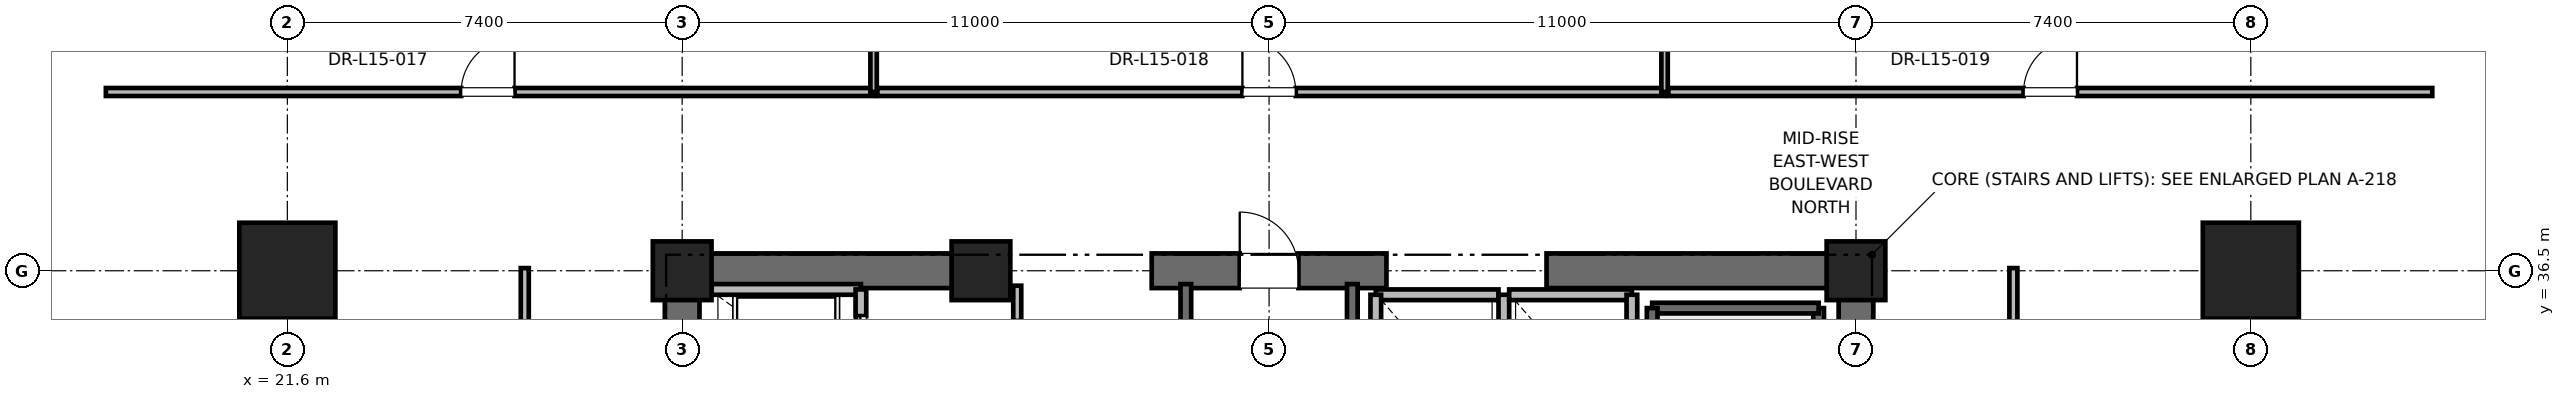
"""IFC4 building model, lengths in metres.
Left out: names, types, materials, properties, quantities, classifications, styles, units other than length and angle.
Written with IfcOpenShell. Run it as: python <this file> out.ifc"""

import sys

from ifc_helpers import new_model, si_unit, direction, frame, frame_2d, origin, origin_2d, place, context, subcontext, project, spatial, rectangle, extrude, element, fill, save


model = new_model("IFC4")
c1 = context("Model", 3, precision=1e-05, world=origin(), true_north=direction((0.0, 1.0)))
c2 = subcontext(c1, "Body", "Model", "MODEL_VIEW")
j1 = project(units=[si_unit("LENGTHUNIT", "METRE"), si_unit("PLANEANGLEUNIT", "RADIAN")], contexts=[c1])
p1 = place(None, origin())
s1 = spatial("IfcSite", under=j1, at=p1, CompositionType="ELEMENT")
p2 = place(p1, origin())
s2 = spatial("IfcBuilding", under=s1, at=p2, CompositionType="ELEMENT")
p3 = place(p2, frame((0.0, 0.0, 67.6)))
s3 = spatial("IfcBuildingStorey", under=s2, at=p3, CompositionType="ELEMENT", Elevation=67.6)
for number, where, z_axis, x_axis in (
    (1, (21.6, 36.5, 0.0), (0.0, 0.0, 1.0), (1.0, 0.0, 0.0)),
    (2, (58.4, 36.5, 0.0), (0.0, 0.0, 1.0), (1.0, 0.0, 0.0)),
):
    element("IfcColumn", number, at=place(p3, frame(where, z_axis=z_axis, x_axis=x_axis)), inside=s3, PredefinedType="COLUMN", context=c2, shape_type="SweptSolid", body=[
        extrude(rectangle(XDim=1.8, YDim=1.8, at=origin_2d()), origin(), (0.0, 0.0, 1.0), 4.0),
    ])
for number, where, z_axis, x_axis in (
    (3, (29.0, 36.5, 0.0), (0.0, 0.0, 1.0), (1.0, 0.0, 0.0)),
    (4, (51.0, 36.5, 0.0), (0.0, 0.0, 1.0), (1.0, 0.0, 0.0)),
    (5, (34.6, 36.5, 0.0), (0.0, 0.0, 1.0), (1.0, 0.0, 0.0)),
):
    element("IfcColumn", number, at=place(p3, frame(where, z_axis=z_axis, x_axis=x_axis)), inside=s3, PredefinedType="PILASTER", context=c2, shape_type="SweptSolid", body=[
        extrude(rectangle(XDim=1.1, YDim=1.1, at=origin_2d()), origin(), (0.0, 0.0, 1.0), 4.0),
    ])
p4 = place(p3, frame((29.0, 36.5, 0.0), z_axis=(0.0, 0.0, 1.0), x_axis=(1.0, 0.0, 0.0)))
e6 = element("IfcWall", 6, at=p4, inside=s3, PredefinedType="SHEAR", context=c2, shape_type="SweptSolid", body=[
    extrude(rectangle(XDim=5.8, YDim=0.65, at=frame_2d((2.9, 0.0))), origin(), (0.0, 0.0, 1.0), 3.76),
])
p5 = place(p3, frame((37.8, 36.5, 0.0), z_axis=(0.0, 0.0, 1.0), x_axis=(1.0, 0.0, 0.0)))
e7 = element("IfcWall", 7, at=p5, inside=s3, PredefinedType="SHEAR", context=c2, shape_type="SweptSolid", body=[
    extrude(rectangle(XDim=4.4, YDim=0.65, at=frame_2d((2.2, 0.0))), origin(), (0.0, 0.0, 1.0), 3.76),
])
p6 = place(p5, frame((1.65, 0.0, 0.0)))
e8 = element("IfcOpeningElement", 8, at=p6, cuts=e7, PredefinedType="OPENING", context=c2, shape_type="SweptSolid", body=[
    extrude(rectangle(XDim=1.1, YDim=2.15, at=frame_2d((0.55, 1.075))), frame((0.0, 0.325, 0.0), z_axis=(0.0, -1.0, 0.0), x_axis=(1.0, 0.0, 0.0)), (0.0, 0.0, 1.0), 0.65),
])
for number, where, z_axis, x_axis in (
    (9, (45.2, 36.5, 0.0), (0.0, 0.0, 1.0), (1.0, 0.0, 0.0)),
    (10, (29.0, 30.7, 0.0), (0.0, 0.0, 1.0), (0.0, 1.0, 0.0)),
):
    element("IfcWall", number, at=place(p3, frame(where, z_axis=z_axis, x_axis=x_axis)), inside=s3, PredefinedType="SHEAR", context=c2, shape_type="SweptSolid", body=[
        extrude(rectangle(XDim=5.8, YDim=0.65, at=frame_2d((2.9, 0.0))), origin(), (0.0, 0.0, 1.0), 3.76),
    ])
p7 = place(p3, frame((51.0, 27.7, 0.0), z_axis=(0.0, 0.0, 1.0), x_axis=(0.0, 1.0, 0.0)))
e11 = element("IfcWall", 11, at=p7, inside=s3, PredefinedType="SHEAR", context=c2, shape_type="SweptSolid", body=[
    extrude(rectangle(XDim=8.8, YDim=0.65, at=frame_2d((4.4, 0.0))), origin(), (0.0, 0.0, 1.0), 3.76),
])
p8 = place(p3, frame((50.3, 27.65, 0.0), z_axis=(0.0, 0.0, 1.0), x_axis=(0.0, 1.0, 0.0)))
e12 = element("IfcWall", 12, at=p8, inside=s3, PredefinedType="SOLIDWALL", context=c2, shape_type="SweptSolid", body=[
    extrude(rectangle(XDim=8.15, YDim=0.2, at=frame_2d((4.075, 0.0))), origin(), (0.0, 0.0, 1.0), 3.76),
])
p9 = place(p3, frame((47.18, 35.8, 0.0), z_axis=(0.0, 0.0, 1.0), x_axis=(1.0, 0.0, 0.0)))
e13 = element("IfcWall", 13, at=p9, inside=s3, PredefinedType="SOLIDWALL", context=c2, shape_type="SweptSolid", body=[
    extrude(rectangle(XDim=3.12, YDim=0.2, at=frame_2d((1.56, 0.0))), origin(), (0.0, 0.0, 1.0), 3.76),
])
p10 = place(p3, frame((47.18, 27.62, 0.0), z_axis=(0.0, 0.0, 1.0), x_axis=(0.0, 1.0, 0.0)))
e14 = element("IfcWall", 14, at=p10, inside=s3, PredefinedType="SOLIDWALL", context=c2, shape_type="SweptSolid", body=[
    extrude(rectangle(XDim=8.18, YDim=0.2, at=frame_2d((4.09, 0.0))), origin(), (0.0, 0.0, 1.0), 3.76),
])
p11 = place(p3, frame((38.44, 27.38, 0.0), z_axis=(0.0, 0.0, 1.0), x_axis=(0.0, 1.0, 0.0)))
e15 = element("IfcWall", 15, at=p11, inside=s3, PredefinedType="SOLIDWALL", context=c2, shape_type="SweptSolid", body=[
    extrude(rectangle(XDim=8.87, YDim=0.2, at=frame_2d((4.435, 0.0))), origin(), (0.0, 0.0, 1.0), 3.76),
])
p12 = place(p3, frame((41.56, 27.68, 0.0), z_axis=(0.0, 0.0, 1.0), x_axis=(0.0, 1.0, 0.0)))
e16 = element("IfcWall", 16, at=p12, inside=s3, PredefinedType="SOLIDWALL", context=c2, shape_type="SweptSolid", body=[
    extrude(rectangle(XDim=8.57, YDim=0.2, at=frame_2d((4.285, 0.0))), origin(), (0.0, 0.0, 1.0), 3.76),
])
p13 = place(p3, frame((32.35, 36.15, 0.0), z_axis=(0.0, 0.0, 1.0), x_axis=(-1.0, 0.0, 0.0)))
e17 = element("IfcWall", 17, at=p13, inside=s3, PredefinedType="SOLIDWALL", context=c2, shape_type="SweptSolid", body=[
    extrude(rectangle(XDim=2.8, YDim=0.2, at=frame_2d((1.4, 0.0))), origin(), (0.0, 0.0, 1.0), 2.889),
])
p14 = place(p3, frame((32.35, 34.05, 0.0), z_axis=(0.0, 0.0, 1.0), x_axis=(0.0, 1.0, 0.0)))
e18 = element("IfcWall", 18, at=p14, inside=s3, PredefinedType="SOLIDWALL", context=c2, shape_type="SweptSolid", body=[
    extrude(rectangle(XDim=2.1, YDim=0.2, at=frame_2d((1.05, 0.0))), origin(), (0.0, 0.0, 1.0), 3.76),
])
p15 = place(p14, frame((0.5, 0.0, 0.0)))
e19 = element("IfcOpeningElement", 19, at=p15, cuts=e18, PredefinedType="OPENING", context=c2, shape_type="SweptSolid", body=[
    extrude(rectangle(XDim=1.1, YDim=2.2, at=frame_2d((0.55, 1.1))), frame((0.0, 0.1, 0.0), z_axis=(0.0, -1.0, 0.0), x_axis=(1.0, 0.0, 0.0)), (0.0, 0.0, 1.0), 0.2),
])
p16 = place(p3, frame((44.3, 36.05, 0.0), z_axis=(0.0, 0.0, 1.0), x_axis=(-1.0, 0.0, 0.0)))
e20 = element("IfcWall", 20, at=p16, inside=s3, PredefinedType="SOLIDWALL", context=c2, shape_type="SweptSolid", body=[
    extrude(rectangle(XDim=2.3, YDim=0.2, at=frame_2d((1.15, 0.0))), origin(), (0.0, 0.0, 1.0), 2.54),
])
for number, where, z_axis, x_axis in (
    (21, (42.0, 36.05, 0.0), (0.0, 0.0, 1.0), (0.0, -1.0, 0.0)),
    (22, (44.4, 33.45, 0.0), (0.0, 0.0, 1.0), (0.0, 1.0, 0.0)),
):
    element("IfcWall", number, at=place(p3, frame(where, z_axis=z_axis, x_axis=x_axis)), inside=s3, PredefinedType="SOLIDWALL", context=c2, shape_type="SweptSolid", body=[
        extrude(rectangle(XDim=2.6, YDim=0.2, at=frame_2d((1.3, 0.0))), origin(), (0.0, 0.0, 1.0), 2.54),
    ])
p17 = place(p3, frame((46.8, 36.05, 0.0), z_axis=(0.0, 0.0, 1.0), x_axis=(-1.0, 0.0, 0.0)))
e23 = element("IfcWall", 23, at=p17, inside=s3, PredefinedType="SOLIDWALL", context=c2, shape_type="SweptSolid", body=[
    extrude(rectangle(XDim=2.3, YDim=0.2, at=frame_2d((1.15, 0.0))), origin(), (0.0, 0.0, 1.0), 2.54),
])
p18 = place(p3, frame((46.8, 33.45, 0.0), z_axis=(0.0, 0.0, 1.0), x_axis=(0.0, 1.0, 0.0)))
e24 = element("IfcWall", 24, at=p18, inside=s3, PredefinedType="SOLIDWALL", context=c2, shape_type="SweptSolid", body=[
    extrude(rectangle(XDim=2.6, YDim=0.2, at=frame_2d((1.3, 0.0))), origin(), (0.0, 0.0, 1.0), 3.76),
])
p19 = place(p3, frame((35.28, 33.95, 0.0), z_axis=(0.0, 0.0, 1.0), x_axis=(0.0, 1.0, 0.0)))
e25 = element("IfcWall", 25, at=p19, inside=s3, PredefinedType="PARTITIONING", context=c2, shape_type="SweptSolid", body=[
    extrude(rectangle(XDim=2.27, YDim=0.15, at=frame_2d((1.135, 0.0))), origin(), (0.0, 0.0, 1.0), 2.54),
])
p20 = place(p19, frame((0.66, 0.0, 0.0)))
e26 = element("IfcOpeningElement", 26, at=p20, cuts=e25, PredefinedType="OPENING", context=c2, shape_type="SweptSolid", body=[
    extrude(rectangle(XDim=0.95, YDim=2.15, at=frame_2d((0.475, 1.075))), frame((0.0, 0.075, 0.0), z_axis=(0.0, -1.0, 0.0), x_axis=(1.0, 0.0, 0.0)), (0.0, 0.0, 1.0), 0.15),
])
p21 = place(p3, frame((18.199, 39.85, 0.0), z_axis=(0.0, 0.0, 1.0), x_axis=(1.0, 0.0, 0.0)))
e27 = element("IfcWall", 27, at=p21, inside=s3, PredefinedType="PARTITIONING", context=c2, shape_type="SweptSolid", body=[
    extrude(rectangle(XDim=14.389, YDim=0.15, at=frame_2d((7.194, 0.0))), origin(), (0.0, 0.0, 1.0), 2.85),
])
p22 = place(p21, frame((6.659, 0.0, 0.0)))
e28 = element("IfcOpeningElement", 28, at=p22, cuts=e27, PredefinedType="OPENING", context=c2, shape_type="SweptSolid", body=[
    extrude(rectangle(XDim=1.0, YDim=2.15, at=frame_2d((0.5, 1.075))), frame((0.0, 0.075, 0.0), z_axis=(0.0, -1.0, 0.0), x_axis=(1.0, 0.0, 0.0)), (0.0, 0.0, 1.0), 0.15),
])
p23 = place(p3, frame((32.588, 39.85, 0.0), z_axis=(0.0, 0.0, 1.0), x_axis=(0.0, 1.0, 0.0)))
e29 = element("IfcWall", 29, at=p23, inside=s3, PredefinedType="PARTITIONING", context=c2, shape_type="SweptSolid", body=[
    extrude(rectangle(XDim=9.991, YDim=0.12, at=frame_2d((4.995, 0.0))), origin(), (0.0, 0.0, 1.0), 2.39),
])
p24 = place(p3, frame((32.658, 39.85, 0.0), z_axis=(0.0, 0.0, 1.0), x_axis=(1.0, 0.0, 0.0)))
e30 = element("IfcWall", 30, at=p24, inside=s3, PredefinedType="PARTITIONING", context=c2, shape_type="SweptSolid", body=[
    extrude(rectangle(XDim=14.755, YDim=0.15, at=frame_2d((7.377, 0.0))), origin(), (0.0, 0.0, 1.0), 2.85),
])
p25 = place(p24, frame((6.842, 0.0, 0.0)))
e31 = element("IfcOpeningElement", 31, at=p25, cuts=e30, PredefinedType="OPENING", context=c2, shape_type="SweptSolid", body=[
    extrude(rectangle(XDim=1.0, YDim=2.15, at=frame_2d((0.5, 1.075))), frame((0.0, 0.075, 0.0), z_axis=(0.0, -1.0, 0.0), x_axis=(1.0, 0.0, 0.0)), (0.0, 0.0, 1.0), 0.15),
])
p26 = place(p3, frame((47.412, 39.85, 0.0), z_axis=(0.0, 0.0, 1.0), x_axis=(0.0, 1.0, 0.0)))
e32 = element("IfcWall", 32, at=p26, inside=s3, PredefinedType="PARTITIONING", context=c2, shape_type="SweptSolid", body=[
    extrude(rectangle(XDim=9.991, YDim=0.12, at=frame_2d((4.995, 0.0))), origin(), (0.0, 0.0, 1.0), 2.39),
])
p27 = place(p3, frame((47.482, 39.85, 0.0), z_axis=(0.0, 0.0, 1.0), x_axis=(1.0, 0.0, 0.0)))
e33 = element("IfcWall", 33, at=p27, inside=s3, PredefinedType="PARTITIONING", context=c2, shape_type="SweptSolid", body=[
    extrude(rectangle(XDim=14.319, YDim=0.15, at=frame_2d((7.159, 0.0))), origin(), (0.0, 0.0, 1.0), 2.85),
])
p28 = place(p27, frame((6.659, 0.0, 0.0)))
e34 = element("IfcOpeningElement", 34, at=p28, cuts=e33, PredefinedType="OPENING", context=c2, shape_type="SweptSolid", body=[
    extrude(rectangle(XDim=1.0, YDim=2.15, at=frame_2d((0.5, 1.075))), frame((0.0, 0.075, 0.0), z_axis=(0.0, -1.0, 0.0), x_axis=(1.0, 0.0, 0.0)), (0.0, 0.0, 1.0), 0.15),
])
p29 = place(p3, frame((26.05, 26.122, 0.0), z_axis=(0.0, 0.0, 1.0), x_axis=(0.0, 1.0, 0.0)))
e35 = element("IfcWall", 35, at=p29, inside=s3, PredefinedType="PARTITIONING", context=c2, shape_type="SweptSolid", body=[
    extrude(rectangle(XDim=10.428, YDim=0.15, at=frame_2d((5.214, 0.0))), origin(), (0.0, 0.0, 1.0), 2.85),
])
p30 = place(p29, frame((4.389, 0.0, 0.0)))
e36 = element("IfcOpeningElement", 36, at=p30, cuts=e35, PredefinedType="OPENING", context=c2, shape_type="SweptSolid", body=[
    extrude(rectangle(XDim=1.5, YDim=2.25, at=frame_2d((0.75, 1.125))), frame((0.0, 0.075, 0.0), z_axis=(0.0, -1.0, 0.0), x_axis=(1.0, 0.0, 0.0)), (0.0, 0.0, 1.0), 0.15),
])
p31 = place(p3, frame((53.95, 29.018, 0.0), z_axis=(0.0, 0.0, 1.0), x_axis=(0.0, 1.0, 0.0)))
e37 = element("IfcWall", 37, at=p31, inside=s3, PredefinedType="PARTITIONING", context=c2, shape_type="SweptSolid", body=[
    extrude(rectangle(XDim=7.532, YDim=0.15, at=frame_2d((3.766, 0.0))), origin(), (0.0, 0.0, 1.0), 2.85),
])
p32 = place(p31, frame((3.191, 0.0, 0.0)))
e38 = element("IfcOpeningElement", 38, at=p32, cuts=e37, PredefinedType="OPENING", context=c2, shape_type="SweptSolid", body=[
    extrude(rectangle(XDim=1.0, YDim=2.15, at=frame_2d((0.5, 1.075))), frame((0.0, 0.075, 0.0), z_axis=(0.0, -1.0, 0.0), x_axis=(1.0, 0.0, 0.0)), (0.0, 0.0, 1.0), 0.15),
])
p33 = place(p6, origin())
e39 = element("IfcDoor", 39, at=p33, inside=s3, OperationType="SINGLE_SWING_LEFT", PredefinedType="DOOR", context=c2, shape_type="SweptSolid", body=[
    extrude(rectangle(XDim=1.1, YDim=2.15, at=frame_2d((0.55, 1.075))), frame((0.0, 0.025, 0.0), z_axis=(0.0, -1.0, 0.0), x_axis=(1.0, 0.0, 0.0)), (0.0, 0.0, 1.0), 0.05),
])
fill(e8, e39)
p34 = place(p15, origin())
e40 = element("IfcDoor", 40, at=p34, inside=s3, OperationType="SLIDING_TO_RIGHT", PredefinedType="DOOR", context=c2, shape_type="SweptSolid", body=[
    extrude(rectangle(XDim=1.1, YDim=2.2, at=frame_2d((0.55, 1.1))), frame((0.0, 0.025, 0.0), z_axis=(0.0, -1.0, 0.0), x_axis=(1.0, 0.0, 0.0)), (0.0, 0.0, 1.0), 0.05),
])
fill(e19, e40)
p35 = place(p22, origin())
e41 = element("IfcDoor", 41, at=p35, inside=s3, OperationType="SINGLE_SWING_RIGHT", PredefinedType="DOOR", context=c2, shape_type="SweptSolid", body=[
    extrude(rectangle(XDim=1.0, YDim=2.15, at=frame_2d((0.5, 1.075))), frame((0.0, 0.025, 0.0), z_axis=(0.0, -1.0, 0.0), x_axis=(1.0, 0.0, 0.0)), (0.0, 0.0, 1.0), 0.05),
])
fill(e28, e41)
p36 = place(p25, origin())
e42 = element("IfcDoor", 42, at=p36, inside=s3, OperationType="SINGLE_SWING_LEFT", PredefinedType="DOOR", context=c2, shape_type="SweptSolid", body=[
    extrude(rectangle(XDim=1.0, YDim=2.15, at=frame_2d((0.5, 1.075))), frame((0.0, 0.025, 0.0), z_axis=(0.0, -1.0, 0.0), x_axis=(1.0, 0.0, 0.0)), (0.0, 0.0, 1.0), 0.05),
])
fill(e31, e42)
p37 = place(p28, origin())
e43 = element("IfcDoor", 43, at=p37, inside=s3, OperationType="SINGLE_SWING_RIGHT", PredefinedType="DOOR", context=c2, shape_type="SweptSolid", body=[
    extrude(rectangle(XDim=1.0, YDim=2.15, at=frame_2d((0.5, 1.075))), frame((0.0, 0.025, 0.0), z_axis=(0.0, -1.0, 0.0), x_axis=(1.0, 0.0, 0.0)), (0.0, 0.0, 1.0), 0.05),
])
fill(e34, e43)
save(model, sys.argv[1])
